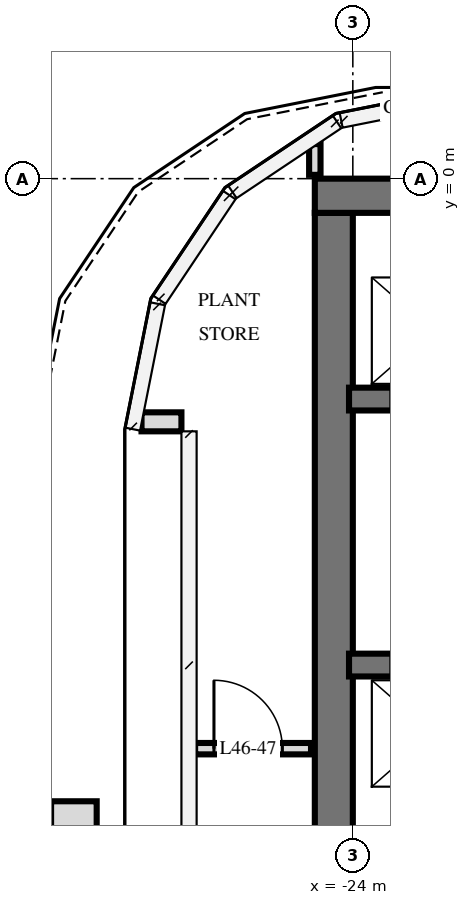
"""IFC4 building model, lengths in metres.
Left out: names, types, materials, properties, quantities, classifications, styles, units other than length and angle.
Written with IfcOpenShell. Run it as: python <this file> out.ifc"""

import sys

from ifc_helpers import new_model, si_unit, direction, frame, frame_2d, origin, place, context, subcontext, project, spatial, rectangle, extrude, element, fill, save


model = new_model("IFC4")
c1 = context("Model", 3, precision=1e-05, world=origin(), true_north=direction((0.0, 1.0)))
c2 = subcontext(c1, "Body", "Model", "MODEL_VIEW")
j1 = project(units=[si_unit("LENGTHUNIT", "METRE"), si_unit("PLANEANGLEUNIT", "RADIAN")], contexts=[c1])
p1 = place(None, origin())
s1 = spatial("IfcSite", under=j1, at=p1, CompositionType="ELEMENT")
p2 = place(p1, origin())
s2 = spatial("IfcBuilding", under=s1, at=p2, CompositionType="ELEMENT")
p3 = place(p2, frame((0.0, 0.0, 177.6)))
s3 = spatial("IfcBuildingStorey", under=s2, at=p3, CompositionType="ELEMENT", Elevation=177.6)
p4 = place(p3, frame((-24.5, -0.225, 0.0), z_axis=(0.0, 0.0, 1.0), x_axis=(1.0, 0.0, 0.0)))
e1 = element("IfcWall", 1, at=p4, inside=s3, PredefinedType="SHEAR", context=c2, shape_type="SweptSolid", body=[
    extrude(rectangle(XDim=14.5, YDim=0.45, at=frame_2d((7.25, 0.0))), origin(), (0.0, 0.0, 1.0), 6.0),
])
p5 = place(p3, frame((-24.25, -14.55, 0.0), z_axis=(0.0, 0.0, 1.0), x_axis=(0.0, 1.0, 0.0)))
e2 = element("IfcWall", 2, at=p5, inside=s3, PredefinedType="SHEAR", context=c2, shape_type="SweptSolid", body=[
    extrude(rectangle(XDim=14.1, YDim=0.5, at=frame_2d((7.05, 0.0))), origin(), (0.0, 0.0, 1.0), 6.0),
])
p6 = place(p3, frame((-24.05, -2.9, 0.0), z_axis=(0.0, 0.0, 1.0), x_axis=(1.0, 0.0, 0.0)))
e3 = element("IfcWall", 3, at=p6, inside=s3, PredefinedType="SHEAR", context=c2, shape_type="SweptSolid", body=[
    extrude(rectangle(XDim=13.7, YDim=0.3, at=frame_2d((6.85, 0.0))), origin(), (0.0, 0.0, 1.0), 6.0),
])
p7 = place(p6, frame((0.55, 0.0, 0.0)))
e4 = element("IfcOpeningElement", 4, at=p7, cuts=e3, PredefinedType="OPENING", context=c2, shape_type="SweptSolid", body=[
    extrude(rectangle(XDim=1.1, YDim=2.1, at=frame_2d((0.55, 1.05))), frame((0.0, 0.16, 0.0), z_axis=(0.0, -1.0, 0.0), x_axis=(1.0, 0.0, 0.0)), (0.0, 0.0, 1.0), 0.32),
])
p8 = place(p6, frame((5.9, 0.0, 0.0)))
e5 = element("IfcOpeningElement", 5, at=p8, cuts=e3, PredefinedType="OPENING", context=c2, shape_type="SweptSolid", body=[
    extrude(rectangle(XDim=0.9, YDim=2.1, at=frame_2d((0.45, 1.05))), frame((0.0, 0.16, 0.0), z_axis=(0.0, -1.0, 0.0), x_axis=(1.0, 0.0, 0.0)), (0.0, 0.0, 1.0), 0.32),
])
p9 = place(p6, frame((11.85, 0.0, 0.0)))
e6 = element("IfcOpeningElement", 6, at=p9, cuts=e3, PredefinedType="OPENING", context=c2, shape_type="SweptSolid", body=[
    extrude(rectangle(XDim=1.0, YDim=2.1, at=frame_2d((0.5, 1.05))), frame((0.0, 0.16, 0.0), z_axis=(0.0, -1.0, 0.0), x_axis=(1.0, 0.0, 0.0)), (0.0, 0.0, 1.0), 0.32),
])
p10 = place(p6, frame((9.312, 0.0, 0.0)))
e7 = element("IfcOpeningElement", 7, at=p10, cuts=e3, PredefinedType="OPENING", context=c2, shape_type="SweptSolid", body=[
    extrude(rectangle(XDim=1.0, YDim=2.1, at=frame_2d((0.5, 1.05))), frame((0.0, 0.16, 0.0), z_axis=(0.0, -1.0, 0.0), x_axis=(1.0, 0.0, 0.0)), (0.0, 0.0, 1.0), 0.32),
])
p11 = place(p6, frame((7.887, 0.0, 0.0)))
e8 = element("IfcOpeningElement", 8, at=p11, cuts=e3, PredefinedType="OPENING", context=c2, shape_type="SweptSolid", body=[
    extrude(rectangle(XDim=1.0, YDim=2.1, at=frame_2d((0.5, 1.05))), frame((0.0, 0.16, 0.0), z_axis=(0.0, -1.0, 0.0), x_axis=(1.0, 0.0, 0.0)), (0.0, 0.0, 1.0), 0.32),
])
p12 = place(p6, frame((3.0, 0.0, 0.0)))
e9 = element("IfcOpeningElement", 9, at=p12, cuts=e3, PredefinedType="OPENING", context=c2, shape_type="SweptSolid", body=[
    extrude(rectangle(XDim=1.0, YDim=2.1, at=frame_2d((0.5, 1.05))), frame((0.0, 0.16, 0.0), z_axis=(0.0, -1.0, 0.0), x_axis=(1.0, 0.0, 0.0)), (0.0, 0.0, 1.0), 0.32),
])
p13 = place(p3, frame((-24.05, -6.4, 0.0), z_axis=(0.0, 0.0, 1.0), x_axis=(1.0, 0.0, 0.0)))
e10 = element("IfcWall", 10, at=p13, inside=s3, PredefinedType="SHEAR", context=c2, shape_type="SweptSolid", body=[
    extrude(rectangle(XDim=13.7, YDim=0.3, at=frame_2d((6.85, 0.0))), origin(), (0.0, 0.0, 1.0), 6.0),
])
p14 = place(p13, frame((2.95, 0.0, 0.0)))
e11 = element("IfcOpeningElement", 11, at=p14, cuts=e10, PredefinedType="OPENING", context=c2, shape_type="SweptSolid", body=[
    extrude(rectangle(XDim=1.1, YDim=2.1, at=frame_2d((0.55, 1.05))), frame((0.0, 0.16, 0.0), z_axis=(0.0, -1.0, 0.0), x_axis=(1.0, 0.0, 0.0)), (0.0, 0.0, 1.0), 0.32),
])
p15 = place(p13, frame((0.55, 0.0, 0.0)))
e12 = element("IfcOpeningElement", 12, at=p15, cuts=e10, PredefinedType="OPENING", context=c2, shape_type="SweptSolid", body=[
    extrude(rectangle(XDim=1.1, YDim=2.1, at=frame_2d((0.55, 1.05))), frame((0.0, 0.16, 0.0), z_axis=(0.0, -1.0, 0.0), x_axis=(1.0, 0.0, 0.0)), (0.0, 0.0, 1.0), 0.32),
])
p16 = place(p13, frame((5.8, 0.0, 0.0)))
e13 = element("IfcOpeningElement", 13, at=p16, cuts=e10, PredefinedType="OPENING", context=c2, shape_type="SweptSolid", body=[
    extrude(rectangle(XDim=1.1, YDim=2.1, at=frame_2d((0.55, 1.05))), frame((0.0, 0.16, 0.0), z_axis=(0.0, -1.0, 0.0), x_axis=(1.0, 0.0, 0.0)), (0.0, 0.0, 1.0), 0.32),
])
p17 = place(p3, frame((-26.255, -3.2, 0.0), z_axis=(0.0, 0.0, 1.0), x_axis=(-1.0, 0.0, 0.0)))
e14 = element("IfcWall", 14, at=p17, inside=s3, PredefinedType="SOLIDWALL", context=c2, shape_type="SweptSolid", body=[
    extrude(rectangle(XDim=0.525, YDim=0.25, at=frame_2d((0.263, 0.0))), origin(), (0.0, 0.0, 1.0), 5.72),
])
p18 = place(p3, frame((-27.67, -12.192, 0.0), z_axis=(0.0, 0.0, 1.0), x_axis=(0.0, 1.0, 0.0)))
e15 = element("IfcWall", 15, at=p18, inside=s3, PredefinedType="USERDEFINED", context=c2, shape_type="SweptSolid", body=[
    extrude(rectangle(XDim=4.0, YDim=0.6, at=frame_2d((2.0, 0.0))), origin(), (0.0, 0.0, 1.0), 0.65),
])
p19 = place(p3, frame((-24.5, 0.05, 0.0), z_axis=(0.0, 0.0, 1.0), x_axis=(0.0, 1.0, 0.0)))
e16 = element("IfcWall", 16, at=p19, inside=s3, PredefinedType="PARTITIONING", context=c2, shape_type="SweptSolid", body=[
    extrude(rectangle(XDim=0.405, YDim=0.15, at=frame_2d((0.203, 0.0))), origin(), (0.0, 0.0, 1.0), 5.7),
])
p20 = place(p3, frame((-26.075, -7.5, 0.0), z_axis=(0.0, 0.0, 1.0), x_axis=(1.0, 0.0, 0.0)))
e17 = element("IfcWall", 17, at=p20, inside=s3, PredefinedType="PARTITIONING", context=c2, shape_type="SweptSolid", body=[
    extrude(rectangle(XDim=1.525, YDim=0.15, at=frame_2d((0.762, 0.0))), origin(), (0.0, 0.0, 1.0), 5.7),
])
p21 = place(p20, frame((0.248, 0.0, 0.0)))
e18 = element("IfcOpeningElement", 18, at=p21, cuts=e17, PredefinedType="OPENING", context=c2, shape_type="SweptSolid", body=[
    extrude(rectangle(XDim=0.9, YDim=2.1, at=frame_2d((0.45, 1.05))), frame((0.0, 0.085, 0.0), z_axis=(0.0, -1.0, 0.0), x_axis=(1.0, 0.0, 0.0)), (0.0, 0.0, 1.0), 0.17),
])
p22 = place(p21, origin())
e19 = element("IfcDoor", 19, at=p22, inside=s3, OperationType="SINGLE_SWING_RIGHT", PredefinedType="DOOR", context=c2, shape_type="SweptSolid", body=[
    extrude(rectangle(XDim=0.9, YDim=2.1, at=frame_2d((0.45, 1.05))), frame((0.0, 0.025, 0.0), z_axis=(0.0, -1.0, 0.0), x_axis=(1.0, 0.0, 0.0)), (0.0, 0.0, 1.0), 0.05),
])
fill(e18, e19)
save(model, sys.argv[1])
